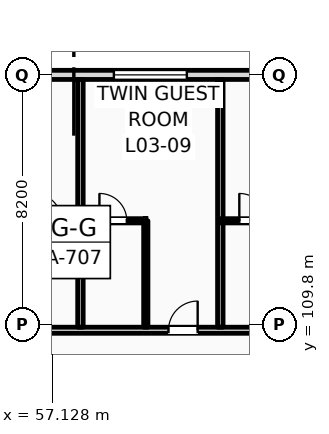
"""IFC4 building model, lengths in metres.
Left out: names, types, materials, properties, quantities, classifications, styles, units other than length and angle.
Written with IfcOpenShell. Run it as: python <this file> out.ifc"""

import sys

from ifc_helpers import new_model, si_unit, direction, frame, frame_2d, origin, place, context, subcontext, project, spatial, rectangle, extrude, element, fill, save


model = new_model("IFC4")
c1 = context("Model", 3, precision=1e-05, world=origin(), true_north=direction((0.0, 1.0)))
c2 = subcontext(c1, "Body", "Model", "MODEL_VIEW")
j1 = project(units=[si_unit("LENGTHUNIT", "METRE"), si_unit("PLANEANGLEUNIT", "RADIAN")], contexts=[c1])
p1 = place(None, origin())
s1 = spatial("IfcSite", under=j1, at=p1, CompositionType="ELEMENT")
p2 = place(p1, origin())
s2 = spatial("IfcBuilding", under=s1, at=p2, CompositionType="ELEMENT")
p3 = place(p2, frame((0.0, 0.0, 16.2)))
s3 = spatial("IfcBuildingStorey", under=s2, at=p3, CompositionType="ELEMENT", Elevation=16.2)
p4 = place(p3, frame((22.5, 118.0, 0.0), z_axis=(0.0, 0.0, 1.0), x_axis=(1.0, 0.0, 0.0)))
e1 = element("IfcWall", 1, at=p4, inside=s3, PredefinedType="STANDARD", context=c2, shape_type="SweptSolid", body=[
    extrude(rectangle(XDim=97.5, YDim=0.3, at=frame_2d((48.75, 0.0))), origin(), (0.0, 0.0, 1.0), 3.36),
])
p5 = place(p4, frame((3.721, 0.0, 0.9)))
e2 = element("IfcOpeningElement", 2, at=p5, cuts=e1, PredefinedType="OPENING", context=c2, shape_type="SweptSolid", body=[
    extrude(rectangle(XDim=0.9, YDim=1.8, at=frame_2d((0.45, 0.9))), frame((0.0, 0.16, 0.0), z_axis=(0.0, -1.0, 0.0), x_axis=(1.0, 0.0, 0.0)), (0.0, 0.0, 1.0), 0.32),
])
p6 = place(p4, frame((6.447, 0.0, 0.9)))
e3 = element("IfcOpeningElement", 3, at=p6, cuts=e1, PredefinedType="OPENING", context=c2, shape_type="SweptSolid", body=[
    extrude(rectangle(XDim=1.35, YDim=1.85, at=frame_2d((0.675, 0.925))), frame((0.0, 0.16, 0.0), z_axis=(0.0, -1.0, 0.0), x_axis=(1.0, 0.0, 0.0)), (0.0, 0.0, 1.0), 0.32),
])
p7 = place(p4, frame((11.363, 0.0, 0.9)))
e4 = element("IfcOpeningElement", 4, at=p7, cuts=e1, PredefinedType="OPENING", context=c2, shape_type="SweptSolid", body=[
    extrude(rectangle(XDim=1.5, YDim=1.9, at=frame_2d((0.75, 0.95))), frame((0.0, 0.16, 0.0), z_axis=(0.0, -1.0, 0.0), x_axis=(1.0, 0.0, 0.0)), (0.0, 0.0, 1.0), 0.32),
])
p8 = place(p4, frame((15.078, 0.0, 0.9)))
e5 = element("IfcOpeningElement", 5, at=p8, cuts=e1, PredefinedType="OPENING", context=c2, shape_type="SweptSolid", body=[
    extrude(rectangle(XDim=1.65, YDim=1.95, at=frame_2d((0.825, 0.975))), frame((0.0, 0.16, 0.0), z_axis=(0.0, -1.0, 0.0), x_axis=(1.0, 0.0, 0.0)), (0.0, 0.0, 1.0), 0.32),
])
p9 = place(p4, frame((19.395, 0.0, 0.9)))
e6 = element("IfcOpeningElement", 6, at=p9, cuts=e1, PredefinedType="OPENING", context=c2, shape_type="SweptSolid", body=[
    extrude(rectangle(XDim=1.8, YDim=2.0, at=frame_2d((0.9, 1.0))), frame((0.0, 0.16, 0.0), z_axis=(0.0, -1.0, 0.0), x_axis=(1.0, 0.0, 0.0)), (0.0, 0.0, 1.0), 0.32),
])
p10 = place(p4, frame((23.31, 0.0, 0.9)))
e7 = element("IfcOpeningElement", 7, at=p10, cuts=e1, PredefinedType="OPENING", context=c2, shape_type="SweptSolid", body=[
    extrude(rectangle(XDim=1.95, YDim=2.05, at=frame_2d((0.975, 1.025))), frame((0.0, 0.16, 0.0), z_axis=(0.0, -1.0, 0.0), x_axis=(1.0, 0.0, 0.0)), (0.0, 0.0, 1.0), 0.32),
])
p11 = place(p4, frame((28.026, 0.0, 0.9)))
e8 = element("IfcOpeningElement", 8, at=p11, cuts=e1, PredefinedType="OPENING", context=c2, shape_type="SweptSolid", body=[
    extrude(rectangle(XDim=2.1, YDim=2.1, at=frame_2d((1.05, 1.05))), frame((0.0, 0.16, 0.0), z_axis=(0.0, -1.0, 0.0), x_axis=(1.0, 0.0, 0.0)), (0.0, 0.0, 1.0), 0.32),
])
p12 = place(p4, frame((31.941, 0.0, 0.9)))
e9 = element("IfcOpeningElement", 9, at=p12, cuts=e1, PredefinedType="OPENING", context=c2, shape_type="SweptSolid", body=[
    extrude(rectangle(XDim=1.1, YDim=2.15, at=frame_2d((0.55, 1.075))), frame((0.0, 0.16, 0.0), z_axis=(0.0, -1.0, 0.0), x_axis=(1.0, 0.0, 0.0)), (0.0, 0.0, 1.0), 0.32),
])
p13 = place(p4, frame((36.657, 0.0, 0.9)))
e10 = element("IfcOpeningElement", 10, at=p13, cuts=e1, PredefinedType="OPENING", context=c2, shape_type="SweptSolid", body=[
    extrude(rectangle(XDim=2.4, YDim=2.2, at=frame_2d((1.2, 1.1))), frame((0.0, 0.16, 0.0), z_axis=(0.0, -1.0, 0.0), x_axis=(1.0, 0.0, 0.0)), (0.0, 0.0, 1.0), 0.32),
])
p14 = place(p4, frame((42.574, 0.0, 0.9)))
e11 = element("IfcOpeningElement", 11, at=p14, cuts=e1, PredefinedType="OPENING", context=c2, shape_type="SweptSolid", body=[
    extrude(rectangle(XDim=1.35, YDim=2.25, at=frame_2d((0.675, 1.125))), frame((0.0, 0.16, 0.0), z_axis=(0.0, -1.0, 0.0), x_axis=(1.0, 0.0, 0.0)), (0.0, 0.0, 1.0), 0.32),
])
p15 = place(p4, frame((45.289, 0.0, 0.9)))
e12 = element("IfcOpeningElement", 12, at=p15, cuts=e1, PredefinedType="OPENING", context=c2, shape_type="SweptSolid", body=[
    extrude(rectangle(XDim=2.7, YDim=2.28, at=frame_2d((1.35, 1.14))), frame((0.0, 0.16, 0.0), z_axis=(0.0, -1.0, 0.0), x_axis=(1.0, 0.0, 0.0)), (0.0, 0.0, 1.0), 0.32),
])
p16 = place(p4, frame((50.406, 0.0, 0.9)))
e13 = element("IfcOpeningElement", 13, at=p16, cuts=e1, PredefinedType="OPENING", context=c2, shape_type="SweptSolid", body=[
    extrude(rectangle(XDim=1.8, YDim=2.28, at=frame_2d((0.9, 1.14))), frame((0.0, 0.16, 0.0), z_axis=(0.0, -1.0, 0.0), x_axis=(1.0, 0.0, 0.0)), (0.0, 0.0, 1.0), 0.32),
])
p17 = place(p4, frame((53.922, 0.0, 0.9)))
e14 = element("IfcOpeningElement", 14, at=p17, cuts=e1, PredefinedType="OPENING", context=c2, shape_type="SweptSolid", body=[
    extrude(rectangle(XDim=1.8, YDim=2.28, at=frame_2d((0.9, 1.14))), frame((0.0, 0.16, 0.0), z_axis=(0.0, -1.0, 0.0), x_axis=(1.0, 0.0, 0.0)), (0.0, 0.0, 1.0), 0.32),
])
p18 = place(p4, frame((58.332, 0.0, 0.9)))
e15 = element("IfcOpeningElement", 15, at=p18, cuts=e1, PredefinedType="OPENING", context=c2, shape_type="SweptSolid", body=[
    extrude(rectangle(XDim=2.961, YDim=2.28, at=frame_2d((1.48, 1.14))), frame((0.0, 0.16, 0.0), z_axis=(0.0, -1.0, 0.0), x_axis=(1.0, 0.0, 0.0)), (0.0, 0.0, 1.0), 0.32),
])
p19 = place(p4, frame((62.513, 0.0, 0.9)))
e16 = element("IfcOpeningElement", 16, at=p19, cuts=e1, PredefinedType="OPENING", context=c2, shape_type="SweptSolid", body=[
    extrude(rectangle(XDim=1.8, YDim=2.28, at=frame_2d((0.9, 1.14))), frame((0.0, 0.16, 0.0), z_axis=(0.0, -1.0, 0.0), x_axis=(1.0, 0.0, 0.0)), (0.0, 0.0, 1.0), 0.32),
])
p20 = place(p4, frame((67.114, 0.0, 0.9)))
e17 = element("IfcOpeningElement", 17, at=p20, cuts=e1, PredefinedType="OPENING", context=c2, shape_type="SweptSolid", body=[
    extrude(rectangle(XDim=2.961, YDim=2.28, at=frame_2d((1.48, 1.14))), frame((0.0, 0.16, 0.0), z_axis=(0.0, -1.0, 0.0), x_axis=(1.0, 0.0, 0.0)), (0.0, 0.0, 1.0), 0.32),
])
p21 = place(p4, frame((73.695, 0.0, 0.9)))
e18 = element("IfcOpeningElement", 18, at=p21, cuts=e1, PredefinedType="OPENING", context=c2, shape_type="SweptSolid", body=[
    extrude(rectangle(XDim=1.1, YDim=2.28, at=frame_2d((0.55, 1.14))), frame((0.0, 0.16, 0.0), z_axis=(0.0, -1.0, 0.0), x_axis=(1.0, 0.0, 0.0)), (0.0, 0.0, 1.0), 0.32),
])
p22 = place(p4, frame((75.895, 0.0, 0.9)))
e19 = element("IfcOpeningElement", 19, at=p22, cuts=e1, PredefinedType="OPENING", context=c2, shape_type="SweptSolid", body=[
    extrude(rectangle(XDim=2.961, YDim=2.28, at=frame_2d((1.48, 1.14))), frame((0.0, 0.16, 0.0), z_axis=(0.0, -1.0, 0.0), x_axis=(1.0, 0.0, 0.0)), (0.0, 0.0, 1.0), 0.32),
])
p23 = place(p4, frame((81.676, 0.0, 0.9)))
e20 = element("IfcOpeningElement", 20, at=p23, cuts=e1, PredefinedType="OPENING", context=c2, shape_type="SweptSolid", body=[
    extrude(rectangle(XDim=1.8, YDim=2.28, at=frame_2d((0.9, 1.14))), frame((0.0, 0.16, 0.0), z_axis=(0.0, -1.0, 0.0), x_axis=(1.0, 0.0, 0.0)), (0.0, 0.0, 1.0), 0.32),
])
p24 = place(p4, frame((84.677, 0.0, 0.9)))
e21 = element("IfcOpeningElement", 21, at=p24, cuts=e1, PredefinedType="OPENING", context=c2, shape_type="SweptSolid", body=[
    extrude(rectangle(XDim=2.961, YDim=2.28, at=frame_2d((1.48, 1.14))), frame((0.0, 0.16, 0.0), z_axis=(0.0, -1.0, 0.0), x_axis=(1.0, 0.0, 0.0)), (0.0, 0.0, 1.0), 0.32),
])
p25 = place(p4, frame((89.999, 0.0, 0.9)))
e22 = element("IfcOpeningElement", 22, at=p25, cuts=e1, PredefinedType="OPENING", context=c2, shape_type="SweptSolid", body=[
    extrude(rectangle(XDim=1.1, YDim=1.5, at=frame_2d((0.55, 0.75))), frame((0.0, 0.16, 0.0), z_axis=(0.0, -1.0, 0.0), x_axis=(1.0, 0.0, 0.0)), (0.0, 0.0, 1.0), 0.32),
])
p26 = place(p4, frame((94.35, 0.0, 0.9)))
e23 = element("IfcOpeningElement", 23, at=p26, cuts=e1, PredefinedType="OPENING", context=c2, shape_type="SweptSolid", body=[
    extrude(rectangle(XDim=1.25, YDim=1.6, at=frame_2d((0.625, 0.8))), frame((0.0, 0.16, 0.0), z_axis=(0.0, -1.0, 0.0), x_axis=(1.0, 0.0, 0.0)), (0.0, 0.0, 1.0), 0.32),
])
p27 = place(p3, frame((10.65, 109.6, 0.0), z_axis=(0.0, 0.0, 1.0), x_axis=(1.0, 0.0, 0.0)))
e24 = element("IfcWall", 24, at=p27, inside=s3, PredefinedType="PARTITIONING", context=c2, shape_type="SweptSolid", body=[
    extrude(rectangle(XDim=109.21, YDim=0.2, at=frame_2d((54.605, 0.0))), origin(), (0.0, 0.0, 1.0), 3.36),
])
p28 = place(p27, frame((15.43, 0.0, 0.0)))
e25 = element("IfcOpeningElement", 25, at=p28, cuts=e24, PredefinedType="OPENING", context=c2, shape_type="SweptSolid", body=[
    extrude(rectangle(XDim=1.02, YDim=2.2, at=frame_2d((0.51, 1.1))), frame((0.0, 0.11, 0.0), z_axis=(0.0, -1.0, 0.0), x_axis=(1.0, 0.0, 0.0)), (0.0, 0.0, 1.0), 0.22),
])
p29 = place(p27, frame((19.537, 0.0, 0.0)))
e26 = element("IfcOpeningElement", 26, at=p29, cuts=e24, PredefinedType="OPENING", context=c2, shape_type="SweptSolid", body=[
    extrude(rectangle(XDim=1.02, YDim=2.2, at=frame_2d((0.51, 1.1))), frame((0.0, 0.11, 0.0), z_axis=(0.0, -1.0, 0.0), x_axis=(1.0, 0.0, 0.0)), (0.0, 0.0, 1.0), 0.22),
])
p30 = place(p27, frame((23.928, 0.0, 0.0)))
e27 = element("IfcOpeningElement", 27, at=p30, cuts=e24, PredefinedType="OPENING", context=c2, shape_type="SweptSolid", body=[
    extrude(rectangle(XDim=1.02, YDim=2.2, at=frame_2d((0.51, 1.1))), frame((0.0, 0.11, 0.0), z_axis=(0.0, -1.0, 0.0), x_axis=(1.0, 0.0, 0.0)), (0.0, 0.0, 1.0), 0.22),
])
p31 = place(p27, frame((26.169, 0.0, 0.0)))
e28 = element("IfcOpeningElement", 28, at=p31, cuts=e24, PredefinedType="OPENING", context=c2, shape_type="SweptSolid", body=[
    extrude(rectangle(XDim=1.02, YDim=2.2, at=frame_2d((0.51, 1.1))), frame((0.0, 0.11, 0.0), z_axis=(0.0, -1.0, 0.0), x_axis=(1.0, 0.0, 0.0)), (0.0, 0.0, 1.0), 0.22),
])
p32 = place(p27, frame((32.739, 0.0, 0.0)))
e29 = element("IfcOpeningElement", 29, at=p32, cuts=e24, PredefinedType="OPENING", context=c2, shape_type="SweptSolid", body=[
    extrude(rectangle(XDim=0.96, YDim=2.2, at=frame_2d((0.48, 1.1))), frame((0.0, 0.11, 0.0), z_axis=(0.0, -1.0, 0.0), x_axis=(1.0, 0.0, 0.0)), (0.0, 0.0, 1.0), 0.22),
])
p33 = place(p27, frame((34.98, 0.0, 0.0)))
e30 = element("IfcOpeningElement", 30, at=p33, cuts=e24, PredefinedType="OPENING", context=c2, shape_type="SweptSolid", body=[
    extrude(rectangle(XDim=0.96, YDim=2.2, at=frame_2d((0.48, 1.1))), frame((0.0, 0.11, 0.0), z_axis=(0.0, -1.0, 0.0), x_axis=(1.0, 0.0, 0.0)), (0.0, 0.0, 1.0), 0.22),
])
p34 = place(p27, frame((41.521, 0.0, 0.0)))
e31 = element("IfcOpeningElement", 31, at=p34, cuts=e24, PredefinedType="OPENING", context=c2, shape_type="SweptSolid", body=[
    extrude(rectangle(XDim=0.96, YDim=2.2, at=frame_2d((0.48, 1.1))), frame((0.0, 0.11, 0.0), z_axis=(0.0, -1.0, 0.0), x_axis=(1.0, 0.0, 0.0)), (0.0, 0.0, 1.0), 0.22),
])
p35 = place(p27, frame((43.512, 0.0, 0.0)))
e32 = element("IfcOpeningElement", 32, at=p35, cuts=e24, PredefinedType="OPENING", context=c2, shape_type="SweptSolid", body=[
    extrude(rectangle(XDim=0.96, YDim=2.2, at=frame_2d((0.48, 1.1))), frame((0.0, 0.11, 0.0), z_axis=(0.0, -1.0, 0.0), x_axis=(1.0, 0.0, 0.0)), (0.0, 0.0, 1.0), 0.22),
])
p36 = place(p27, frame((50.303, 0.0, 0.0)))
e33 = element("IfcOpeningElement", 33, at=p36, cuts=e24, PredefinedType="OPENING", context=c2, shape_type="SweptSolid", body=[
    extrude(rectangle(XDim=0.96, YDim=2.2, at=frame_2d((0.48, 1.1))), frame((0.0, 0.11, 0.0), z_axis=(0.0, -1.0, 0.0), x_axis=(1.0, 0.0, 0.0)), (0.0, 0.0, 1.0), 0.22),
])
p37 = place(p27, frame((54.944, 0.0, 0.0)))
e34 = element("IfcOpeningElement", 34, at=p37, cuts=e24, PredefinedType="OPENING", context=c2, shape_type="SweptSolid", body=[
    extrude(rectangle(XDim=0.96, YDim=2.2, at=frame_2d((0.48, 1.1))), frame((0.0, 0.11, 0.0), z_axis=(0.0, -1.0, 0.0), x_axis=(1.0, 0.0, 0.0)), (0.0, 0.0, 1.0), 0.22),
])
p38 = place(p27, frame((59.085, 0.0, 0.0)))
e35 = element("IfcOpeningElement", 35, at=p38, cuts=e24, PredefinedType="OPENING", context=c2, shape_type="SweptSolid", body=[
    extrude(rectangle(XDim=0.96, YDim=2.2, at=frame_2d((0.48, 1.1))), frame((0.0, 0.11, 0.0), z_axis=(0.0, -1.0, 0.0), x_axis=(1.0, 0.0, 0.0)), (0.0, 0.0, 1.0), 0.22),
])
p39 = place(p27, frame((63.476, 0.0, 0.0)))
e36 = element("IfcOpeningElement", 36, at=p39, cuts=e24, PredefinedType="OPENING", context=c2, shape_type="SweptSolid", body=[
    extrude(rectangle(XDim=0.96, YDim=2.2, at=frame_2d((0.48, 1.1))), frame((0.0, 0.11, 0.0), z_axis=(0.0, -1.0, 0.0), x_axis=(1.0, 0.0, 0.0)), (0.0, 0.0, 1.0), 0.22),
])
p40 = place(p27, frame((65.716, 0.0, 0.0)))
e37 = element("IfcOpeningElement", 37, at=p40, cuts=e24, PredefinedType="OPENING", context=c2, shape_type="SweptSolid", body=[
    extrude(rectangle(XDim=0.96, YDim=2.2, at=frame_2d((0.48, 1.1))), frame((0.0, 0.11, 0.0), z_axis=(0.0, -1.0, 0.0), x_axis=(1.0, 0.0, 0.0)), (0.0, 0.0, 1.0), 0.22),
])
p41 = place(p27, frame((72.257, 0.0, 0.0)))
e38 = element("IfcOpeningElement", 38, at=p41, cuts=e24, PredefinedType="OPENING", context=c2, shape_type="SweptSolid", body=[
    extrude(rectangle(XDim=0.96, YDim=2.2, at=frame_2d((0.48, 1.1))), frame((0.0, 0.11, 0.0), z_axis=(0.0, -1.0, 0.0), x_axis=(1.0, 0.0, 0.0)), (0.0, 0.0, 1.0), 0.22),
])
p42 = place(p27, frame((74.498, 0.0, 0.0)))
e39 = element("IfcOpeningElement", 39, at=p42, cuts=e24, PredefinedType="OPENING", context=c2, shape_type="SweptSolid", body=[
    extrude(rectangle(XDim=0.96, YDim=2.2, at=frame_2d((0.48, 1.1))), frame((0.0, 0.11, 0.0), z_axis=(0.0, -1.0, 0.0), x_axis=(1.0, 0.0, 0.0)), (0.0, 0.0, 1.0), 0.22),
])
p43 = place(p27, frame((81.039, 0.0, 0.0)))
e40 = element("IfcOpeningElement", 40, at=p43, cuts=e24, PredefinedType="OPENING", context=c2, shape_type="SweptSolid", body=[
    extrude(rectangle(XDim=0.96, YDim=2.2, at=frame_2d((0.48, 1.1))), frame((0.0, 0.11, 0.0), z_axis=(0.0, -1.0, 0.0), x_axis=(1.0, 0.0, 0.0)), (0.0, 0.0, 1.0), 0.22),
])
p44 = place(p27, frame((85.68, 0.0, 0.0)))
e41 = element("IfcOpeningElement", 41, at=p44, cuts=e24, PredefinedType="OPENING", context=c2, shape_type="SweptSolid", body=[
    extrude(rectangle(XDim=0.96, YDim=2.2, at=frame_2d((0.48, 1.1))), frame((0.0, 0.11, 0.0), z_axis=(0.0, -1.0, 0.0), x_axis=(1.0, 0.0, 0.0)), (0.0, 0.0, 1.0), 0.22),
])
p45 = place(p27, frame((89.82, 0.0, 0.0)))
e42 = element("IfcOpeningElement", 42, at=p45, cuts=e24, PredefinedType="OPENING", context=c2, shape_type="SweptSolid", body=[
    extrude(rectangle(XDim=0.96, YDim=2.2, at=frame_2d((0.48, 1.1))), frame((0.0, 0.11, 0.0), z_axis=(0.0, -1.0, 0.0), x_axis=(1.0, 0.0, 0.0)), (0.0, 0.0, 1.0), 0.22),
])
p46 = place(p27, frame((94.211, 0.0, 0.0)))
e43 = element("IfcOpeningElement", 43, at=p46, cuts=e24, PredefinedType="OPENING", context=c2, shape_type="SweptSolid", body=[
    extrude(rectangle(XDim=0.96, YDim=2.2, at=frame_2d((0.48, 1.1))), frame((0.0, 0.11, 0.0), z_axis=(0.0, -1.0, 0.0), x_axis=(1.0, 0.0, 0.0)), (0.0, 0.0, 1.0), 0.22),
])
p47 = place(p27, frame((98.602, 0.0, 0.0)))
e44 = element("IfcOpeningElement", 44, at=p47, cuts=e24, PredefinedType="OPENING", context=c2, shape_type="SweptSolid", body=[
    extrude(rectangle(XDim=0.96, YDim=2.2, at=frame_2d((0.48, 1.1))), frame((0.0, 0.11, 0.0), z_axis=(0.0, -1.0, 0.0), x_axis=(1.0, 0.0, 0.0)), (0.0, 0.0, 1.0), 0.22),
])
p48 = place(p27, frame((102.993, 0.0, 0.0)))
e45 = element("IfcOpeningElement", 45, at=p48, cuts=e24, PredefinedType="OPENING", context=c2, shape_type="SweptSolid", body=[
    extrude(rectangle(XDim=0.96, YDim=2.2, at=frame_2d((0.48, 1.1))), frame((0.0, 0.11, 0.0), z_axis=(0.0, -1.0, 0.0), x_axis=(1.0, 0.0, 0.0)), (0.0, 0.0, 1.0), 0.22),
])
p49 = place(p27, frame((105.269, 0.0, 0.0)))
e46 = element("IfcOpeningElement", 46, at=p49, cuts=e24, PredefinedType="OPENING", context=c2, shape_type="SweptSolid", body=[
    extrude(rectangle(XDim=0.96, YDim=2.2, at=frame_2d((0.48, 1.1))), frame((0.0, 0.11, 0.0), z_axis=(0.0, -1.0, 0.0), x_axis=(1.0, 0.0, 0.0)), (0.0, 0.0, 1.0), 0.22),
])
p50 = place(p27, frame((2.716, 0.0, 0.0)))
e47 = element("IfcOpeningElement", 47, at=p50, cuts=e24, PredefinedType="OPENING", context=c2, shape_type="SweptSolid", body=[
    extrude(rectangle(XDim=1.35, YDim=2.25, at=frame_2d((0.675, 1.125))), frame((0.0, 0.11, 0.0), z_axis=(0.0, -1.0, 0.0), x_axis=(1.0, 0.0, 0.0)), (0.0, 0.0, 1.0), 0.22),
])
p51 = place(p27, frame((6.65, 0.0, 0.0)))
e48 = element("IfcOpeningElement", 48, at=p51, cuts=e24, PredefinedType="OPENING", context=c2, shape_type="SweptSolid", body=[
    extrude(rectangle(XDim=1.35, YDim=2.25, at=frame_2d((0.675, 1.125))), frame((0.0, 0.11, 0.0), z_axis=(0.0, -1.0, 0.0), x_axis=(1.0, 0.0, 0.0)), (0.0, 0.0, 1.0), 0.22),
])
p52 = place(p27, frame((10.583, 0.0, 0.0)))
e49 = element("IfcOpeningElement", 49, at=p52, cuts=e24, PredefinedType="OPENING", context=c2, shape_type="SweptSolid", body=[
    extrude(rectangle(XDim=1.35, YDim=2.25, at=frame_2d((0.675, 1.125))), frame((0.0, 0.11, 0.0), z_axis=(0.0, -1.0, 0.0), x_axis=(1.0, 0.0, 0.0)), (0.0, 0.0, 1.0), 0.22),
])
p53 = place(p3, frame((58.057, 109.7, 0.0), z_axis=(0.0, 0.0, 1.0), x_axis=(0.0, 1.0, 0.0)))
e50 = element("IfcWall", 50, at=p53, inside=s3, PredefinedType="PARTITIONING", context=c2, shape_type="SweptSolid", body=[
    extrude(rectangle(XDim=8.15, YDim=0.18, at=frame_2d((4.075, 0.0))), origin(), (0.0, 0.0, 1.0), 3.92),
])
p54 = place(p3, frame((55.907, 113.2, 0.0), z_axis=(0.0, 0.0, 1.0), x_axis=(1.0, 0.0, 0.0)))
e51 = element("IfcWall", 51, at=p54, inside=s3, PredefinedType="PARTITIONING", context=c2, shape_type="SweptSolid", body=[
    extrude(rectangle(XDim=2.15, YDim=0.14, at=frame_2d((1.075, 0.0))), origin(), (0.0, 0.0, 1.0), 3.92),
])
p55 = place(p54, frame((0.625, 0.0, 0.0)))
e52 = element("IfcOpeningElement", 52, at=p55, cuts=e51, PredefinedType="OPENING", context=c2, shape_type="SweptSolid", body=[
    extrude(rectangle(XDim=0.9, YDim=2.1, at=frame_2d((0.45, 1.05))), frame((0.0, 0.08, 0.0), z_axis=(0.0, -1.0, 0.0), x_axis=(1.0, 0.0, 0.0)), (0.0, 0.0, 1.0), 0.16),
])
p56 = place(p3, frame((62.658, 109.7, 0.0), z_axis=(0.0, 0.0, 1.0), x_axis=(0.0, 1.0, 0.0)))
e53 = element("IfcWall", 53, at=p56, inside=s3, PredefinedType="PARTITIONING", context=c2, shape_type="SweptSolid", body=[
    extrude(rectangle(XDim=8.15, YDim=0.18, at=frame_2d((4.075, 0.0))), origin(), (0.0, 0.0, 1.0), 3.92),
])
p57 = place(p3, frame((60.207, 109.7, 0.0), z_axis=(0.0, 0.0, 1.0), x_axis=(0.0, 1.0, 0.0)))
e54 = element("IfcWall", 54, at=p57, inside=s3, PredefinedType="PARTITIONING", context=c2, shape_type="SweptSolid", body=[
    extrude(rectangle(XDim=3.5, YDim=0.14, at=frame_2d((1.75, 0.0))), origin(), (0.0, 0.0, 1.0), 3.92),
])
p58 = place(p3, frame((58.057, 113.2, 0.0), z_axis=(0.0, 0.0, 1.0), x_axis=(1.0, 0.0, 0.0)))
e55 = element("IfcWall", 55, at=p58, inside=s3, PredefinedType="PARTITIONING", context=c2, shape_type="SweptSolid", body=[
    extrude(rectangle(XDim=2.15, YDim=0.14, at=frame_2d((1.075, 0.0))), origin(), (0.0, 0.0, 1.0), 3.92),
])
p59 = place(p58, frame((0.625, 0.0, 0.0)))
e56 = element("IfcOpeningElement", 56, at=p59, cuts=e55, PredefinedType="OPENING", context=c2, shape_type="SweptSolid", body=[
    extrude(rectangle(XDim=0.9, YDim=2.1, at=frame_2d((0.45, 1.05))), frame((0.0, 0.08, 0.0), z_axis=(0.0, -1.0, 0.0), x_axis=(1.0, 0.0, 0.0)), (0.0, 0.0, 1.0), 0.16),
])
p60 = place(p3, frame((62.658, 113.2, 0.0), z_axis=(0.0, 0.0, 1.0), x_axis=(1.0, 0.0, 0.0)))
e57 = element("IfcWall", 57, at=p60, inside=s3, PredefinedType="PARTITIONING", context=c2, shape_type="SweptSolid", body=[
    extrude(rectangle(XDim=2.15, YDim=0.14, at=frame_2d((1.075, 0.0))), origin(), (0.0, 0.0, 1.0), 3.92),
])
p61 = place(p60, frame((0.625, 0.0, 0.0)))
e58 = element("IfcOpeningElement", 58, at=p61, cuts=e57, PredefinedType="OPENING", context=c2, shape_type="SweptSolid", body=[
    extrude(rectangle(XDim=0.9, YDim=2.1, at=frame_2d((0.45, 1.05))), frame((0.0, 0.08, 0.0), z_axis=(0.0, -1.0, 0.0), x_axis=(1.0, 0.0, 0.0)), (0.0, 0.0, 1.0), 0.16),
])
p62 = place(p13, origin())
e59 = element("IfcWindow", 59, at=p62, inside=s3, PartitioningType="DOUBLE_PANEL_VERTICAL", PredefinedType="WINDOW", context=c2, shape_type="SweptSolid", body=[
    extrude(rectangle(XDim=2.4, YDim=2.2, at=frame_2d((1.2, 1.1))), frame((0.0, 0.03, 0.0), z_axis=(0.0, -1.0, 0.0), x_axis=(1.0, 0.0, 0.0)), (0.0, 0.0, 1.0), 0.06),
])
fill(e10, e59)
p63 = place(p55, origin())
e60 = element("IfcDoor", 60, at=p63, inside=s3, OperationType="SINGLE_SWING_LEFT", PredefinedType="DOOR", context=c2, shape_type="SweptSolid", body=[
    extrude(rectangle(XDim=0.9, YDim=2.1, at=frame_2d((0.45, 1.05))), frame((0.0, 0.025, 0.0), z_axis=(0.0, -1.0, 0.0), x_axis=(1.0, 0.0, 0.0)), (0.0, 0.0, 1.0), 0.05),
])
fill(e52, e60)
p64 = place(p36, origin())
e61 = element("IfcDoor", 61, at=p64, inside=s3, OperationType="SINGLE_SWING_RIGHT", PredefinedType="DOOR", context=c2, shape_type="SweptSolid", body=[
    extrude(rectangle(XDim=0.96, YDim=2.2, at=frame_2d((0.48, 1.1))), frame((0.0, 0.025, 0.0), z_axis=(0.0, -1.0, 0.0), x_axis=(1.0, 0.0, 0.0)), (0.0, 0.0, 1.0), 0.05),
])
fill(e33, e61)
p65 = place(p59, origin())
e62 = element("IfcDoor", 62, at=p65, inside=s3, OperationType="SINGLE_SWING_LEFT", PredefinedType="DOOR", context=c2, shape_type="SweptSolid", body=[
    extrude(rectangle(XDim=0.9, YDim=2.1, at=frame_2d((0.45, 1.05))), frame((0.0, 0.025, 0.0), z_axis=(0.0, -1.0, 0.0), x_axis=(1.0, 0.0, 0.0)), (0.0, 0.0, 1.0), 0.05),
])
fill(e56, e62)
p66 = place(p61, origin())
e63 = element("IfcDoor", 63, at=p66, inside=s3, OperationType="SINGLE_SWING_LEFT", PredefinedType="DOOR", context=c2, shape_type="SweptSolid", body=[
    extrude(rectangle(XDim=0.9, YDim=2.1, at=frame_2d((0.45, 1.05))), frame((0.0, 0.025, 0.0), z_axis=(0.0, -1.0, 0.0), x_axis=(1.0, 0.0, 0.0)), (0.0, 0.0, 1.0), 0.05),
])
fill(e58, e63)
save(model, sys.argv[1])
